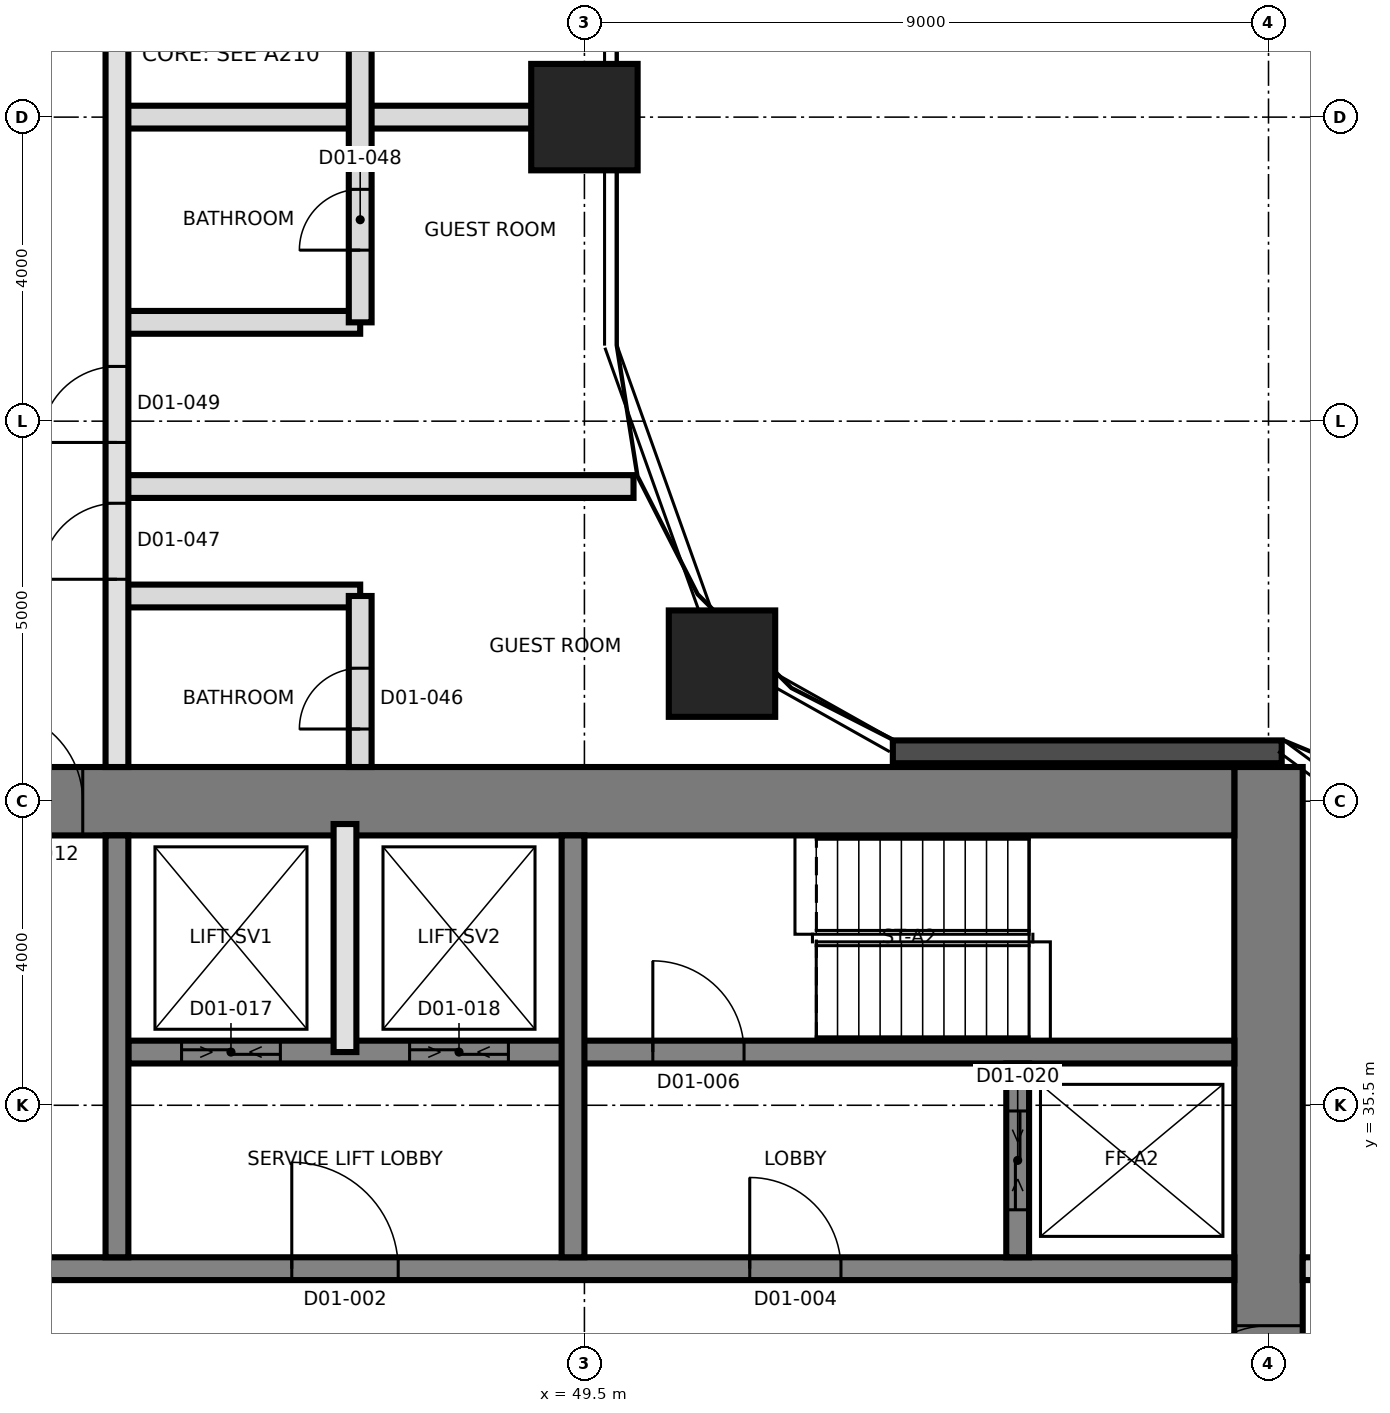
"""IFC4 building model, lengths in metres.
Left out: names, types, materials, properties, quantities, classifications, styles, units other than length and angle.
Written with IfcOpenShell. Run it as: python <this file> out.ifc"""

import sys

from ifc_helpers import new_model, si_unit, direction, frame, frame_2d, origin, origin_2d, place, context, subcontext, project, spatial, rectangle, extrude, element, fill, save


model = new_model("IFC4")
c1 = context("Model", 3, precision=1e-05, world=origin(), true_north=direction((0.0, 1.0)))
c2 = subcontext(c1, "Body", "Model", "MODEL_VIEW")
j1 = project(units=[si_unit("LENGTHUNIT", "METRE"), si_unit("PLANEANGLEUNIT", "RADIAN")], contexts=[c1])
p1 = place(None, origin())
s1 = spatial("IfcSite", under=j1, at=p1, CompositionType="ELEMENT")
p2 = place(p1, origin())
s2 = spatial("IfcBuilding", under=s1, at=p2, CompositionType="ELEMENT")
p3 = place(p2, frame((0.0, 0.0, 37.2)))
s3 = spatial("IfcBuildingStorey", under=s2, at=p3, CompositionType="ELEMENT", Elevation=37.2)
p4 = place(p3, frame((58.5, 21.05, 0.0), z_axis=(0.0, 0.0, 1.0), x_axis=(0.0, 1.0, 0.0)))
e1 = element("IfcWall", 1, at=p4, inside=s3, PredefinedType="SHEAR", context=c2, shape_type="SweptSolid", body=[
    extrude(rectangle(XDim=18.9, YDim=0.9, at=frame_2d((9.45, 0.0))), origin(), (0.0, 0.0, 1.0), 3.7),
])
p5 = place(p4, frame((10.35, 0.0, 0.0)))
e2 = element("IfcOpeningElement", 2, at=p5, cuts=e1, PredefinedType="OPENING", context=c2, shape_type="SweptSolid", body=[
    extrude(rectangle(XDim=1.2, YDim=2.1, at=frame_2d((0.6, 1.05))), frame((0.0, 0.46, 0.0), z_axis=(0.0, -1.0, 0.0), x_axis=(1.0, 0.0, 0.0)), (0.0, 0.0, 1.0), 0.92),
])
p6 = place(p3, frame((31.05, 39.5, 0.0), z_axis=(0.0, 0.0, 1.0), x_axis=(1.0, 0.0, 0.0)))
e3 = element("IfcWall", 3, at=p6, inside=s3, PredefinedType="SHEAR", context=c2, shape_type="SweptSolid", body=[
    extrude(rectangle(XDim=27.0, YDim=0.9, at=frame_2d((13.5, 0.0))), origin(), (0.0, 0.0, 1.0), 3.7),
])
p7 = place(p6, frame((10.65, 0.0, 0.0)))
e4 = element("IfcOpeningElement", 4, at=p7, cuts=e3, PredefinedType="OPENING", context=c2, shape_type="SweptSolid", body=[
    extrude(rectangle(XDim=1.2, YDim=2.1, at=frame_2d((0.6, 1.05))), frame((0.0, 0.46, 0.0), z_axis=(0.0, -1.0, 0.0), x_axis=(1.0, 0.0, 0.0)), (0.0, 0.0, 1.0), 0.92),
])
p8 = place(p3, frame((31.95, 33.35, 0.0), z_axis=(0.0, 0.0, 1.0), x_axis=(1.0, 0.0, 0.0)))
e5 = element("IfcWall", 5, at=p8, inside=s3, PredefinedType="SHEAR", context=c2, shape_type="SweptSolid", body=[
    extrude(rectangle(XDim=26.1, YDim=0.3, at=frame_2d((13.05, 0.0))), origin(), (0.0, 0.0, 1.0), 3.7),
])
p9 = place(p8, frame((13.7, 0.0, 0.0)))
e6 = element("IfcOpeningElement", 6, at=p9, cuts=e5, PredefinedType="OPENING", context=c2, shape_type="SweptSolid", body=[
    extrude(rectangle(XDim=1.4, YDim=2.1, at=frame_2d((0.7, 1.05))), frame((0.0, 0.16, 0.0), z_axis=(0.0, -1.0, 0.0), x_axis=(1.0, 0.0, 0.0)), (0.0, 0.0, 1.0), 0.32),
])
p10 = place(p8, frame((5.175, 0.0, 0.0)))
e7 = element("IfcOpeningElement", 7, at=p10, cuts=e5, PredefinedType="OPENING", context=c2, shape_type="SweptSolid", body=[
    extrude(rectangle(XDim=1.2, YDim=2.1, at=frame_2d((0.6, 1.05))), frame((0.0, 0.16, 0.0), z_axis=(0.0, -1.0, 0.0), x_axis=(1.0, 0.0, 0.0)), (0.0, 0.0, 1.0), 0.32),
])
p11 = place(p8, frame((19.725, 0.0, 0.0)))
e8 = element("IfcOpeningElement", 8, at=p11, cuts=e5, PredefinedType="OPENING", context=c2, shape_type="SweptSolid", body=[
    extrude(rectangle(XDim=1.2, YDim=2.1, at=frame_2d((0.6, 1.05))), frame((0.0, 0.16, 0.0), z_axis=(0.0, -1.0, 0.0), x_axis=(1.0, 0.0, 0.0)), (0.0, 0.0, 1.0), 0.32),
])
p12 = place(p3, frame((43.5, 36.2, 0.0), z_axis=(0.0, 0.0, 1.0), x_axis=(1.0, 0.0, 0.0)))
e9 = element("IfcWall", 9, at=p12, inside=s3, PredefinedType="SHEAR", context=c2, shape_type="SweptSolid", body=[
    extrude(rectangle(XDim=14.55, YDim=0.3, at=frame_2d((7.275, 0.0))), origin(), (0.0, 0.0, 1.0), 3.7),
])
p13 = place(p12, frame((6.9, 0.0, 0.0)))
e10 = element("IfcOpeningElement", 10, at=p13, cuts=e9, PredefinedType="OPENING", context=c2, shape_type="SweptSolid", body=[
    extrude(rectangle(XDim=1.2, YDim=2.1, at=frame_2d((0.6, 1.05))), frame((0.0, 0.16, 0.0), z_axis=(0.0, -1.0, 0.0), x_axis=(1.0, 0.0, 0.0)), (0.0, 0.0, 1.0), 0.32),
])
p14 = place(p12, frame((0.7, 0.0, 0.0)))
e11 = element("IfcOpeningElement", 11, at=p14, cuts=e9, PredefinedType="OPENING", context=c2, shape_type="SweptSolid", body=[
    extrude(rectangle(XDim=1.3, YDim=2.4, at=frame_2d((0.65, 1.2))), frame((0.0, 0.16, 0.0), z_axis=(0.0, -1.0, 0.0), x_axis=(1.0, 0.0, 0.0)), (0.0, 0.0, 1.0), 0.32),
])
p15 = place(p12, frame((3.7, 0.0, 0.0)))
e12 = element("IfcOpeningElement", 12, at=p15, cuts=e9, PredefinedType="OPENING", context=c2, shape_type="SweptSolid", body=[
    extrude(rectangle(XDim=1.3, YDim=2.4, at=frame_2d((0.65, 1.2))), frame((0.0, 0.16, 0.0), z_axis=(0.0, -1.0, 0.0), x_axis=(1.0, 0.0, 0.0)), (0.0, 0.0, 1.0), 0.32),
])
for number, where, z_axis, x_axis in (
    (13, (43.35, 33.5, 0.0), (0.0, 0.0, 1.0), (0.0, 1.0, 0.0)),
    (14, (49.35, 33.5, 0.0), (0.0, 0.0, 1.0), (0.0, 1.0, 0.0)),
):
    element("IfcWall", number, at=place(p3, frame(where, z_axis=z_axis, x_axis=x_axis)), inside=s3, PredefinedType="SHEAR", context=c2, shape_type="SweptSolid", body=[
        extrude(rectangle(XDim=5.55, YDim=0.3, at=frame_2d((2.775, 0.0))), origin(), (0.0, 0.0, 1.0), 3.7),
    ])
p16 = place(p3, frame((55.2, 33.5, 0.0), z_axis=(0.0, 0.0, 1.0), x_axis=(0.0, 1.0, 0.0)))
e15 = element("IfcWall", 15, at=p16, inside=s3, PredefinedType="SHEAR", context=c2, shape_type="SweptSolid", body=[
    extrude(rectangle(XDim=2.55, YDim=0.3, at=frame_2d((1.275, 0.0))), origin(), (0.0, 0.0, 1.0), 3.7),
])
p17 = place(p16, frame((0.625, 0.0, 0.0)))
e16 = element("IfcOpeningElement", 16, at=p17, cuts=e15, PredefinedType="OPENING", context=c2, shape_type="SweptSolid", body=[
    extrude(rectangle(XDim=1.3, YDim=2.4, at=frame_2d((0.65, 1.2))), frame((0.0, 0.16, 0.0), z_axis=(0.0, -1.0, 0.0), x_axis=(1.0, 0.0, 0.0)), (0.0, 0.0, 1.0), 0.32),
])
for number, where, z_axis, x_axis in (
    (17, (51.31, 41.31, 0.0), (0.0, 0.0, 1.0), (1.0, 0.0, 0.0)),
    (18, (49.5, 48.5, 0.0), (0.0, 0.0, 1.0), (1.0, 0.0, 0.0)),
):
    element("IfcColumn", number, at=place(p3, frame(where, z_axis=z_axis, x_axis=x_axis)), inside=s3, PredefinedType="COLUMN", context=c2, shape_type="SweptSolid", body=[
        extrude(rectangle(XDim=1.4, YDim=1.4, at=origin_2d()), origin(), (0.0, 0.0, 1.0), 3.7),
    ])
p18 = place(p3, frame((58.674, 40.15, 0.0), z_axis=(0.0, 0.0, 1.0), x_axis=(-1.0, 0.0, 0.0)))
e19 = element("IfcWall", 19, at=p18, inside=s3, PredefinedType="SOLIDWALL", context=c2, shape_type="SweptSolid", body=[
    extrude(rectangle(XDim=5.116, YDim=0.3, at=frame_2d((2.558, 0.0))), origin(), (0.0, 0.0, 1.0), 3.4),
])
p19 = place(p3, frame((46.35, 36.2, 0.0), z_axis=(0.0, 0.0, 1.0), x_axis=(0.0, 1.0, 0.0)))
e20 = element("IfcWall", 20, at=p19, inside=s3, PredefinedType="SOLIDWALL", context=c2, shape_type="SweptSolid", body=[
    extrude(rectangle(XDim=3.0, YDim=0.3, at=frame_2d((1.5, 0.0))), origin(), (0.0, 0.0, 1.0), 3.4),
])
p20 = place(p3, frame((58.95, 33.35, 0.0), z_axis=(0.0, 0.0, 1.0), x_axis=(1.0, 0.0, 0.0)))
e21 = element("IfcWall", 21, at=p20, inside=s3, PredefinedType="PARTITIONING", context=c2, shape_type="SweptSolid", body=[
    extrude(rectangle(XDim=26.38, YDim=0.3, at=frame_2d((13.19, 0.0))), origin(), (0.0, 0.0, 1.0), 3.4),
])
p21 = place(p20, frame((1.9, 0.0, 0.0)))
e22 = element("IfcOpeningElement", 22, at=p21, cuts=e21, PredefinedType="OPENING", context=c2, shape_type="SweptSolid", body=[
    extrude(rectangle(XDim=1.0, YDim=2.4, at=frame_2d((0.5, 1.2))), frame((0.0, 0.16, 0.0), z_axis=(0.0, -1.0, 0.0), x_axis=(1.0, 0.0, 0.0)), (0.0, 0.0, 1.0), 0.32),
])
p22 = place(p20, frame((9.7, 0.0, 0.0)))
e23 = element("IfcOpeningElement", 23, at=p22, cuts=e21, PredefinedType="OPENING", context=c2, shape_type="SweptSolid", body=[
    extrude(rectangle(XDim=1.0, YDim=2.1, at=frame_2d((0.5, 1.05))), frame((0.0, 0.16, 0.0), z_axis=(0.0, -1.0, 0.0), x_axis=(1.0, 0.0, 0.0)), (0.0, 0.0, 1.0), 0.32),
])
p23 = place(p20, frame((15.55, 0.0, 0.0)))
e24 = element("IfcOpeningElement", 24, at=p23, cuts=e21, PredefinedType="OPENING", context=c2, shape_type="SweptSolid", body=[
    extrude(rectangle(XDim=1.0, YDim=2.1, at=frame_2d((0.5, 1.05))), frame((0.0, 0.16, 0.0), z_axis=(0.0, -1.0, 0.0), x_axis=(1.0, 0.0, 0.0)), (0.0, 0.0, 1.0), 0.32),
])
p24 = place(p20, frame((18.7, 0.0, 0.0)))
e25 = element("IfcOpeningElement", 25, at=p24, cuts=e21, PredefinedType="OPENING", context=c2, shape_type="SweptSolid", body=[
    extrude(rectangle(XDim=1.0, YDim=2.1, at=frame_2d((0.5, 1.05))), frame((0.0, 0.16, 0.0), z_axis=(0.0, -1.0, 0.0), x_axis=(1.0, 0.0, 0.0)), (0.0, 0.0, 1.0), 0.32),
])
p25 = place(p20, frame((24.55, 0.0, 0.0)))
e26 = element("IfcOpeningElement", 26, at=p25, cuts=e21, PredefinedType="OPENING", context=c2, shape_type="SweptSolid", body=[
    extrude(rectangle(XDim=1.0, YDim=2.1, at=frame_2d((0.5, 1.05))), frame((0.0, 0.16, 0.0), z_axis=(0.0, -1.0, 0.0), x_axis=(1.0, 0.0, 0.0)), (0.0, 0.0, 1.0), 0.32),
])
p26 = place(p3, frame((43.35, 42.2, 0.0), z_axis=(0.0, 0.0, 1.0), x_axis=(1.0, 0.0, 0.0)))
e27 = element("IfcWall", 27, at=p26, inside=s3, PredefinedType="PARTITIONING", context=c2, shape_type="SweptSolid", body=[
    extrude(rectangle(XDim=3.2, YDim=0.3, at=frame_2d((1.6, 0.0))), origin(), (0.0, 0.0, 1.0), 3.4),
])
p27 = place(p3, frame((43.35, 43.64, 0.0), z_axis=(0.0, 0.0, 1.0), x_axis=(1.0, 0.0, 0.0)))
e28 = element("IfcWall", 28, at=p27, inside=s3, PredefinedType="PARTITIONING", context=c2, shape_type="SweptSolid", body=[
    extrude(rectangle(XDim=6.796, YDim=0.3, at=frame_2d((3.398, 0.0))), origin(), (0.0, 0.0, 1.0), 3.4),
])
p28 = place(p3, frame((43.35, 45.8, 0.0), z_axis=(0.0, 0.0, 1.0), x_axis=(1.0, 0.0, 0.0)))
e29 = element("IfcWall", 29, at=p28, inside=s3, PredefinedType="PARTITIONING", context=c2, shape_type="SweptSolid", body=[
    extrude(rectangle(XDim=3.2, YDim=0.3, at=frame_2d((1.6, 0.0))), origin(), (0.0, 0.0, 1.0), 3.4),
])
p29 = place(p3, frame((43.35, 48.5, 0.0), z_axis=(0.0, 0.0, 1.0), x_axis=(1.0, 0.0, 0.0)))
e30 = element("IfcWall", 30, at=p29, inside=s3, PredefinedType="PARTITIONING", context=c2, shape_type="SweptSolid", body=[
    extrude(rectangle(XDim=6.225, YDim=0.3, at=frame_2d((3.112, 0.0))), origin(), (0.0, 0.0, 1.0), 3.4),
])
p30 = place(p3, frame((43.35, 39.95, 0.0), z_axis=(0.0, 0.0, 1.0), x_axis=(0.0, 1.0, 0.0)))
e31 = element("IfcWall", 31, at=p30, inside=s3, PredefinedType="SOLIDWALL", context=c2, shape_type="SweptSolid", body=[
    extrude(rectangle(XDim=25.85, YDim=0.3, at=frame_2d((12.925, 0.0))), origin(), (0.0, 0.0, 1.0), 3.4),
])
p31 = place(p30, frame((2.47, 0.0, 0.0)))
e32 = element("IfcOpeningElement", 32, at=p31, cuts=e31, PredefinedType="OPENING", context=c2, shape_type="SweptSolid", body=[
    extrude(rectangle(XDim=1.0, YDim=2.1, at=frame_2d((0.5, 1.05))), frame((0.0, 0.16, 0.0), z_axis=(0.0, -1.0, 0.0), x_axis=(1.0, 0.0, 0.0)), (0.0, 0.0, 1.0), 0.32),
])
p32 = place(p30, frame((4.27, 0.0, 0.0)))
e33 = element("IfcOpeningElement", 33, at=p32, cuts=e31, PredefinedType="OPENING", context=c2, shape_type="SweptSolid", body=[
    extrude(rectangle(XDim=1.0, YDim=2.1, at=frame_2d((0.5, 1.05))), frame((0.0, 0.16, 0.0), z_axis=(0.0, -1.0, 0.0), x_axis=(1.0, 0.0, 0.0)), (0.0, 0.0, 1.0), 0.32),
])
p33 = place(p30, frame((11.65, 0.0, 0.0)))
e34 = element("IfcOpeningElement", 34, at=p33, cuts=e31, PredefinedType="OPENING", context=c2, shape_type="SweptSolid", body=[
    extrude(rectangle(XDim=1.0, YDim=2.1, at=frame_2d((0.5, 1.05))), frame((0.0, 0.16, 0.0), z_axis=(0.0, -1.0, 0.0), x_axis=(1.0, 0.0, 0.0)), (0.0, 0.0, 1.0), 0.32),
])
p34 = place(p30, frame((13.45, 0.0, 0.0)))
e35 = element("IfcOpeningElement", 35, at=p34, cuts=e31, PredefinedType="OPENING", context=c2, shape_type="SweptSolid", body=[
    extrude(rectangle(XDim=1.0, YDim=2.1, at=frame_2d((0.5, 1.05))), frame((0.0, 0.16, 0.0), z_axis=(0.0, -1.0, 0.0), x_axis=(1.0, 0.0, 0.0)), (0.0, 0.0, 1.0), 0.32),
])
p35 = place(p30, frame((21.1, 0.0, 0.0)))
e36 = element("IfcOpeningElement", 36, at=p35, cuts=e31, PredefinedType="OPENING", context=c2, shape_type="SweptSolid", body=[
    extrude(rectangle(XDim=1.0, YDim=2.4, at=frame_2d((0.5, 1.2))), frame((0.0, 0.16, 0.0), z_axis=(0.0, -1.0, 0.0), x_axis=(1.0, 0.0, 0.0)), (0.0, 0.0, 1.0), 0.32),
])
p36 = place(p3, frame((46.55, 39.95, 0.0), z_axis=(0.0, 0.0, 1.0), x_axis=(0.0, 1.0, 0.0)))
e37 = element("IfcWall", 37, at=p36, inside=s3, PredefinedType="PARTITIONING", context=c2, shape_type="SweptSolid", body=[
    extrude(rectangle(XDim=2.25, YDim=0.3, at=frame_2d((1.125, 0.0))), origin(), (0.0, 0.0, 1.0), 3.4),
])
p37 = place(p36, frame((0.5, 0.0, 0.0)))
e38 = element("IfcOpeningElement", 38, at=p37, cuts=e37, PredefinedType="OPENING", context=c2, shape_type="SweptSolid", body=[
    extrude(rectangle(XDim=0.8, YDim=2.1, at=frame_2d((0.4, 1.05))), frame((0.0, 0.16, 0.0), z_axis=(0.0, -1.0, 0.0), x_axis=(1.0, 0.0, 0.0)), (0.0, 0.0, 1.0), 0.32),
])
p38 = place(p3, frame((46.55, 45.8, 0.0), z_axis=(0.0, 0.0, 1.0), x_axis=(0.0, 1.0, 0.0)))
e39 = element("IfcWall", 39, at=p38, inside=s3, PredefinedType="PARTITIONING", context=c2, shape_type="SweptSolid", body=[
    extrude(rectangle(XDim=5.4, YDim=0.3, at=frame_2d((2.7, 0.0))), origin(), (0.0, 0.0, 1.0), 3.4),
])
p39 = place(p38, frame((0.95, 0.0, 0.0)))
e40 = element("IfcOpeningElement", 40, at=p39, cuts=e39, PredefinedType="OPENING", context=c2, shape_type="SweptSolid", body=[
    extrude(rectangle(XDim=0.8, YDim=2.1, at=frame_2d((0.4, 1.05))), frame((0.0, 0.16, 0.0), z_axis=(0.0, -1.0, 0.0), x_axis=(1.0, 0.0, 0.0)), (0.0, 0.0, 1.0), 0.32),
])
p40 = place(p38, frame((3.65, 0.0, 0.0)))
e41 = element("IfcOpeningElement", 41, at=p40, cuts=e39, PredefinedType="OPENING", context=c2, shape_type="SweptSolid", body=[
    extrude(rectangle(XDim=0.8, YDim=2.1, at=frame_2d((0.4, 1.05))), frame((0.0, 0.16, 0.0), z_axis=(0.0, -1.0, 0.0), x_axis=(1.0, 0.0, 0.0)), (0.0, 0.0, 1.0), 0.32),
])
p41 = place(p9, origin())
e42 = element("IfcDoor", 42, at=p41, inside=s3, OperationType="SINGLE_SWING_RIGHT", PredefinedType="DOOR", context=c2, shape_type="SweptSolid", body=[
    extrude(rectangle(XDim=1.4, YDim=2.1, at=frame_2d((0.7, 1.05))), frame((0.0, 0.025, 0.0), z_axis=(0.0, -1.0, 0.0), x_axis=(1.0, 0.0, 0.0)), (0.0, 0.0, 1.0), 0.05),
])
fill(e6, e42)
p42 = place(p11, origin())
e43 = element("IfcDoor", 43, at=p42, inside=s3, OperationType="SINGLE_SWING_RIGHT", PredefinedType="DOOR", context=c2, shape_type="SweptSolid", body=[
    extrude(rectangle(XDim=1.2, YDim=2.1, at=frame_2d((0.6, 1.05))), frame((0.0, 0.025, 0.0), z_axis=(0.0, -1.0, 0.0), x_axis=(1.0, 0.0, 0.0)), (0.0, 0.0, 1.0), 0.05),
])
fill(e8, e43)
p43 = place(p13, origin())
e44 = element("IfcDoor", 44, at=p43, inside=s3, OperationType="SINGLE_SWING_LEFT", PredefinedType="DOOR", context=c2, shape_type="SweptSolid", body=[
    extrude(rectangle(XDim=1.2, YDim=2.1, at=frame_2d((0.6, 1.05))), frame((0.0, 0.025, 0.0), z_axis=(0.0, -1.0, 0.0), x_axis=(1.0, 0.0, 0.0)), (0.0, 0.0, 1.0), 0.05),
])
fill(e10, e44)
p44 = place(p5, origin())
e45 = element("IfcDoor", 45, at=p44, inside=s3, OperationType="SINGLE_SWING_LEFT", PredefinedType="DOOR", context=c2, shape_type="SweptSolid", body=[
    extrude(rectangle(XDim=1.2, YDim=2.1, at=frame_2d((0.6, 1.05))), frame((0.0, 0.025, 0.0), z_axis=(0.0, -1.0, 0.0), x_axis=(1.0, 0.0, 0.0)), (0.0, 0.0, 1.0), 0.05),
])
fill(e2, e45)
p45 = place(p7, origin())
e46 = element("IfcDoor", 46, at=p45, inside=s3, OperationType="SINGLE_SWING_RIGHT", PredefinedType="DOOR", context=c2, shape_type="SweptSolid", body=[
    extrude(rectangle(XDim=1.2, YDim=2.1, at=frame_2d((0.6, 1.05))), frame((0.0, 0.025, 0.0), z_axis=(0.0, -1.0, 0.0), x_axis=(1.0, 0.0, 0.0)), (0.0, 0.0, 1.0), 0.05),
])
fill(e4, e46)
p46 = place(p14, origin())
e47 = element("IfcDoor", 47, at=p46, inside=s3, OperationType="SLIDING_TO_LEFT", PredefinedType="DOOR", context=c2, shape_type="SweptSolid", body=[
    extrude(rectangle(XDim=1.3, YDim=2.4, at=frame_2d((0.65, 1.2))), frame((0.0, 0.025, 0.0), z_axis=(0.0, -1.0, 0.0), x_axis=(1.0, 0.0, 0.0)), (0.0, 0.0, 1.0), 0.05),
])
fill(e11, e47)
p47 = place(p15, origin())
e48 = element("IfcDoor", 48, at=p47, inside=s3, OperationType="SLIDING_TO_LEFT", PredefinedType="DOOR", context=c2, shape_type="SweptSolid", body=[
    extrude(rectangle(XDim=1.3, YDim=2.4, at=frame_2d((0.65, 1.2))), frame((0.0, 0.025, 0.0), z_axis=(0.0, -1.0, 0.0), x_axis=(1.0, 0.0, 0.0)), (0.0, 0.0, 1.0), 0.05),
])
fill(e12, e48)
p48 = place(p17, origin())
e49 = element("IfcDoor", 49, at=p48, inside=s3, OperationType="SLIDING_TO_LEFT", PredefinedType="DOOR", context=c2, shape_type="SweptSolid", body=[
    extrude(rectangle(XDim=1.3, YDim=2.4, at=frame_2d((0.65, 1.2))), frame((0.0, 0.025, 0.0), z_axis=(0.0, -1.0, 0.0), x_axis=(1.0, 0.0, 0.0)), (0.0, 0.0, 1.0), 0.05),
])
fill(e16, e49)
p49 = place(p37, origin())
e50 = element("IfcDoor", 50, at=p49, inside=s3, OperationType="SINGLE_SWING_RIGHT", PredefinedType="DOOR", context=c2, shape_type="SweptSolid", body=[
    extrude(rectangle(XDim=0.8, YDim=2.1, at=frame_2d((0.4, 1.05))), frame((0.0, 0.025, 0.0), z_axis=(0.0, -1.0, 0.0), x_axis=(1.0, 0.0, 0.0)), (0.0, 0.0, 1.0), 0.05),
])
fill(e38, e50)
p50 = place(p31, origin())
e51 = element("IfcDoor", 51, at=p50, inside=s3, OperationType="SINGLE_SWING_LEFT", PredefinedType="DOOR", context=c2, shape_type="SweptSolid", body=[
    extrude(rectangle(XDim=1.0, YDim=2.1, at=frame_2d((0.5, 1.05))), frame((0.0, 0.025, 0.0), z_axis=(0.0, -1.0, 0.0), x_axis=(1.0, 0.0, 0.0)), (0.0, 0.0, 1.0), 0.05),
])
fill(e32, e51)
p51 = place(p39, origin())
e52 = element("IfcDoor", 52, at=p51, inside=s3, OperationType="SINGLE_SWING_LEFT", PredefinedType="DOOR", context=c2, shape_type="SweptSolid", body=[
    extrude(rectangle(XDim=0.8, YDim=2.1, at=frame_2d((0.4, 1.05))), frame((0.0, 0.025, 0.0), z_axis=(0.0, -1.0, 0.0), x_axis=(1.0, 0.0, 0.0)), (0.0, 0.0, 1.0), 0.05),
])
fill(e40, e52)
p52 = place(p32, origin())
e53 = element("IfcDoor", 53, at=p52, inside=s3, OperationType="SINGLE_SWING_LEFT", PredefinedType="DOOR", context=c2, shape_type="SweptSolid", body=[
    extrude(rectangle(XDim=1.0, YDim=2.1, at=frame_2d((0.5, 1.05))), frame((0.0, 0.025, 0.0), z_axis=(0.0, -1.0, 0.0), x_axis=(1.0, 0.0, 0.0)), (0.0, 0.0, 1.0), 0.05),
])
fill(e33, e53)
save(model, sys.argv[1])
